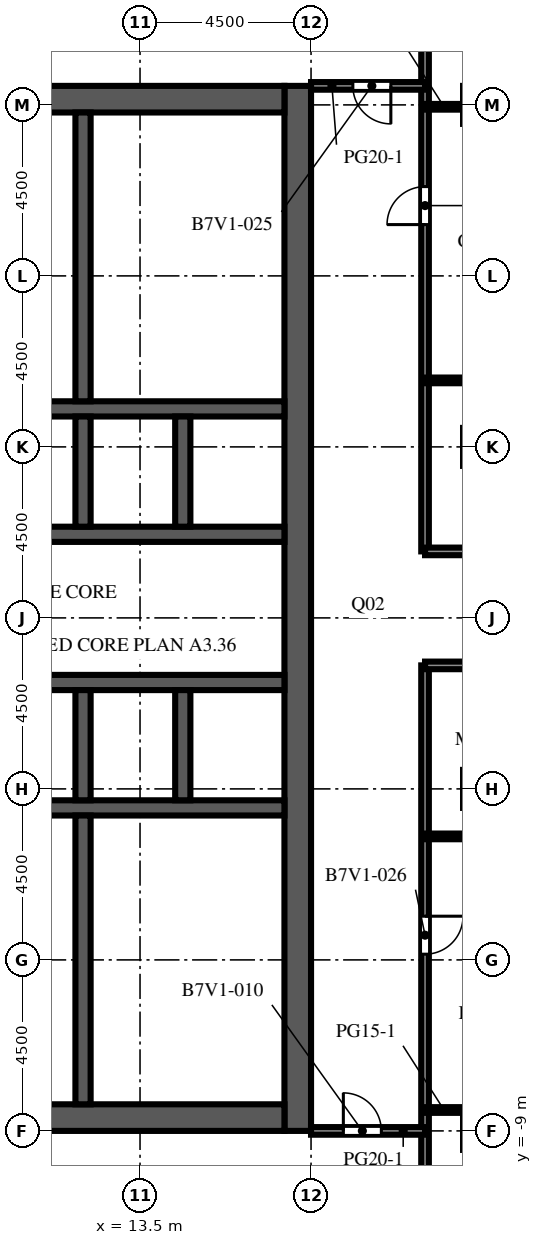
"""IFC4 building model, lengths in metres.
Left out: names, types, materials, properties, quantities, classifications, styles, units other than length and angle.
Written with IfcOpenShell. Run it as: python <this file> out.ifc"""

import sys

from ifc_helpers import new_model, si_unit, direction, frame, frame_2d, origin, place, context, subcontext, project, spatial, rectangle, extrude, element, fill, save


model = new_model("IFC4")
c1 = context("Model", 3, precision=1e-05, world=origin(), true_north=direction((0.0, 1.0)))
c2 = subcontext(c1, "Body", "Model", "MODEL_VIEW")
j1 = project(units=[si_unit("LENGTHUNIT", "METRE"), si_unit("PLANEANGLEUNIT", "RADIAN")], contexts=[c1])
p1 = place(None, origin())
s1 = spatial("IfcSite", under=j1, at=p1, CompositionType="ELEMENT")
p2 = place(p1, origin())
s2 = spatial("IfcBuilding", under=s1, at=p2, CompositionType="ELEMENT")
p3 = place(p2, frame((0.0, 0.0, 243.9)))
s3 = spatial("IfcBuildingStorey", under=s2, at=p3, CompositionType="ELEMENT", Elevation=243.9)
p4 = place(p3, frame((17.65, -9.0, 0.0), z_axis=(0.0, 0.0, 1.0), x_axis=(0.0, 1.0, 0.0)))
e1 = element("IfcWall", 1, at=p4, inside=s3, PredefinedType="SHEAR", context=c2, shape_type="SweptSolid", body=[
    extrude(rectangle(XDim=27.5, YDim=0.7, at=frame_2d((13.75, 0.0))), origin(), (0.0, 0.0, 1.0), 4.1),
])
p5 = place(p4, frame((12.55, 0.0, 0.0)))
e2 = element("IfcOpeningElement", 2, at=p5, cuts=e1, PredefinedType="OPENING", context=c2, shape_type="SweptSolid", body=[
    extrude(rectangle(XDim=2.4, YDim=2.4, at=frame_2d((1.2, 1.2))), frame((0.0, 0.36, 0.0), z_axis=(0.0, -1.0, 0.0), x_axis=(1.0, 0.0, 0.0)), (0.0, 0.0, 1.0), 0.72),
])
p6 = place(p4, frame((6.825, 0.0, 0.0)))
e3 = element("IfcOpeningElement", 3, at=p6, cuts=e1, PredefinedType="OPENING", context=c2, shape_type="SweptSolid", body=[
    extrude(rectangle(XDim=1.2, YDim=2.1, at=frame_2d((0.6, 1.05))), frame((0.0, 0.36, 0.0), z_axis=(0.0, -1.0, 0.0), x_axis=(1.0, 0.0, 0.0)), (0.0, 0.0, 1.0), 0.72),
])
p7 = place(p4, frame((19.475, 0.0, 0.0)))
e4 = element("IfcOpeningElement", 4, at=p7, cuts=e1, PredefinedType="OPENING", context=c2, shape_type="SweptSolid", body=[
    extrude(rectangle(XDim=1.2, YDim=2.1, at=frame_2d((0.6, 1.05))), frame((0.0, 0.36, 0.0), z_axis=(0.0, -1.0, 0.0), x_axis=(1.0, 0.0, 0.0)), (0.0, 0.0, 1.0), 0.72),
])
for number, where, z_axis, x_axis in (
    (5, (6.7, -8.65, 0.0), (0.0, 0.0, 1.0), (1.0, 0.0, 0.0)),
    (6, (6.7, 18.15, 0.0), (0.0, 0.0, 1.0), (1.0, 0.0, 0.0)),
):
    element("IfcWall", number, at=place(p3, frame(where, z_axis=z_axis, x_axis=x_axis)), inside=s3, PredefinedType="SHEAR", context=c2, shape_type="SweptSolid", body=[
        extrude(rectangle(XDim=10.6, YDim=0.7, at=frame_2d((5.3, 0.0))), origin(), (0.0, 0.0, 1.0), 4.1),
    ])
p8 = place(p3, frame((6.7, -0.5, 0.0), z_axis=(0.0, 0.0, 1.0), x_axis=(1.0, 0.0, 0.0)))
e7 = element("IfcWall", 7, at=p8, inside=s3, PredefinedType="SHEAR", context=c2, shape_type="SweptSolid", body=[
    extrude(rectangle(XDim=10.6, YDim=0.4, at=frame_2d((5.3, 0.0))), origin(), (0.0, 0.0, 1.0), 4.1),
])
p9 = place(p3, frame((6.7, 2.8, 0.0), z_axis=(0.0, 0.0, 1.0), x_axis=(1.0, 0.0, 0.0)))
e8 = element("IfcWall", 8, at=p9, inside=s3, PredefinedType="SHEAR", context=c2, shape_type="SweptSolid", body=[
    extrude(rectangle(XDim=10.6, YDim=0.4, at=frame_2d((5.3, 0.0))), origin(), (0.0, 0.0, 1.0), 4.1),
])
p10 = place(p9, frame((0.688, 0.0, 0.0)))
e9 = element("IfcOpeningElement", 9, at=p10, cuts=e8, PredefinedType="OPENING", context=c2, shape_type="SweptSolid", body=[
    extrude(rectangle(XDim=1.1, YDim=2.1, at=frame_2d((0.55, 1.05))), frame((0.0, 0.21, 0.0), z_axis=(0.0, -1.0, 0.0), x_axis=(1.0, 0.0, 0.0)), (0.0, 0.0, 1.0), 0.42),
])
p11 = place(p9, frame((3.438, 0.0, 0.0)))
e10 = element("IfcOpeningElement", 10, at=p11, cuts=e8, PredefinedType="OPENING", context=c2, shape_type="SweptSolid", body=[
    extrude(rectangle(XDim=1.1, YDim=2.1, at=frame_2d((0.55, 1.05))), frame((0.0, 0.21, 0.0), z_axis=(0.0, -1.0, 0.0), x_axis=(1.0, 0.0, 0.0)), (0.0, 0.0, 1.0), 0.42),
])
p12 = place(p9, frame((6.113, 0.0, 0.0)))
e11 = element("IfcOpeningElement", 11, at=p12, cuts=e8, PredefinedType="OPENING", context=c2, shape_type="SweptSolid", body=[
    extrude(rectangle(XDim=1.0, YDim=2.1, at=frame_2d((0.5, 1.05))), frame((0.0, 0.21, 0.0), z_axis=(0.0, -1.0, 0.0), x_axis=(1.0, 0.0, 0.0)), (0.0, 0.0, 1.0), 0.42),
])
p13 = place(p9, frame((8.863, 0.0, 0.0)))
e12 = element("IfcOpeningElement", 12, at=p13, cuts=e8, PredefinedType="OPENING", context=c2, shape_type="SweptSolid", body=[
    extrude(rectangle(XDim=1.0, YDim=2.1, at=frame_2d((0.5, 1.05))), frame((0.0, 0.21, 0.0), z_axis=(0.0, -1.0, 0.0), x_axis=(1.0, 0.0, 0.0)), (0.0, 0.0, 1.0), 0.42),
])
p14 = place(p3, frame((6.7, 6.7, 0.0), z_axis=(0.0, 0.0, 1.0), x_axis=(1.0, 0.0, 0.0)))
e13 = element("IfcWall", 13, at=p14, inside=s3, PredefinedType="SHEAR", context=c2, shape_type="SweptSolid", body=[
    extrude(rectangle(XDim=10.6, YDim=0.4, at=frame_2d((5.3, 0.0))), origin(), (0.0, 0.0, 1.0), 4.1),
])
p15 = place(p14, frame((3.438, 0.0, 0.0)))
e14 = element("IfcOpeningElement", 14, at=p15, cuts=e13, PredefinedType="OPENING", context=c2, shape_type="SweptSolid", body=[
    extrude(rectangle(XDim=1.1, YDim=2.1, at=frame_2d((0.55, 1.05))), frame((0.0, 0.21, 0.0), z_axis=(0.0, -1.0, 0.0), x_axis=(1.0, 0.0, 0.0)), (0.0, 0.0, 1.0), 0.42),
])
p16 = place(p14, frame((6.062, 0.0, 0.0)))
e15 = element("IfcOpeningElement", 15, at=p16, cuts=e13, PredefinedType="OPENING", context=c2, shape_type="SweptSolid", body=[
    extrude(rectangle(XDim=1.1, YDim=2.1, at=frame_2d((0.55, 1.05))), frame((0.0, 0.21, 0.0), z_axis=(0.0, -1.0, 0.0), x_axis=(1.0, 0.0, 0.0)), (0.0, 0.0, 1.0), 0.42),
])
p17 = place(p14, frame((8.812, 0.0, 0.0)))
e16 = element("IfcOpeningElement", 16, at=p17, cuts=e13, PredefinedType="OPENING", context=c2, shape_type="SweptSolid", body=[
    extrude(rectangle(XDim=1.1, YDim=2.1, at=frame_2d((0.55, 1.05))), frame((0.0, 0.21, 0.0), z_axis=(0.0, -1.0, 0.0), x_axis=(1.0, 0.0, 0.0)), (0.0, 0.0, 1.0), 0.42),
])
p18 = place(p14, frame((0.738, 0.0, 0.0)))
e17 = element("IfcOpeningElement", 17, at=p18, cuts=e13, PredefinedType="OPENING", context=c2, shape_type="SweptSolid", body=[
    extrude(rectangle(XDim=1.0, YDim=2.1, at=frame_2d((0.5, 1.05))), frame((0.0, 0.21, 0.0), z_axis=(0.0, -1.0, 0.0), x_axis=(1.0, 0.0, 0.0)), (0.0, 0.0, 1.0), 0.42),
])
p19 = place(p3, frame((6.7, 10.0, 0.0), z_axis=(0.0, 0.0, 1.0), x_axis=(1.0, 0.0, 0.0)))
e18 = element("IfcWall", 18, at=p19, inside=s3, PredefinedType="SHEAR", context=c2, shape_type="SweptSolid", body=[
    extrude(rectangle(XDim=10.6, YDim=0.4, at=frame_2d((5.3, 0.0))), origin(), (0.0, 0.0, 1.0), 4.1),
])
for number, where, z_axis, x_axis in (
    (19, (12.0, -0.3, 0.0), (0.0, 0.0, 1.0), (0.0, 1.0, 0.0)),
    (20, (12.0, 6.9, 0.0), (0.0, 0.0, 1.0), (0.0, 1.0, 0.0)),
    (21, (14.625, -0.3, 0.0), (0.0, 0.0, 1.0), (0.0, 1.0, 0.0)),
    (22, (14.625, 6.9, 0.0), (0.0, 0.0, 1.0), (0.0, 1.0, 0.0)),
):
    element("IfcWall", number, at=place(p3, frame(where, z_axis=z_axis, x_axis=x_axis)), inside=s3, PredefinedType="SHEAR", context=c2, shape_type="SweptSolid", body=[
        extrude(rectangle(XDim=2.9, YDim=0.4, at=frame_2d((1.45, 0.0))), origin(), (0.0, 0.0, 1.0), 4.1),
    ])
for number, where, z_axis, x_axis in (
    (23, (12.0, -8.3, 0.0), (0.0, 0.0, 1.0), (0.0, 1.0, 0.0)),
    (24, (12.0, 10.2, 0.0), (0.0, 0.0, 1.0), (0.0, 1.0, 0.0)),
):
    element("IfcWall", number, at=place(p3, frame(where, z_axis=z_axis, x_axis=x_axis)), inside=s3, PredefinedType="SHEAR", context=c2, shape_type="SweptSolid", body=[
        extrude(rectangle(XDim=7.6, YDim=0.4, at=frame_2d((3.8, 0.0))), origin(), (0.0, 0.0, 1.0), 4.1),
    ])
for number, where, z_axis, x_axis in (
    (25, (8.2, -5.716, 0.0), (0.0, 0.0, 1.0), (1.0, 0.0, 0.0)),
    (26, (8.2, -3.588, 0.0), (0.0, 0.0, 1.0), (1.0, 0.0, 0.0)),
):
    element("IfcWall", number, at=place(p3, frame(where, z_axis=z_axis, x_axis=x_axis)), inside=s3, PredefinedType="PARTITIONING", context=c2, shape_type="SweptSolid", body=[
        extrude(rectangle(XDim=3.6, YDim=0.1, at=frame_2d((1.8, 0.0))), origin(), (0.0, 0.0, 1.0), 3.65),
    ])
for number, where, z_axis, x_axis in (
    (27, (8.1, 12.48, 0.0), (0.0, 0.0, 1.0), (1.0, 0.0, 0.0)),
    (28, (8.1, 14.912, 0.0), (0.0, 0.0, 1.0), (1.0, 0.0, 0.0)),
):
    element("IfcWall", number, at=place(p3, frame(where, z_axis=z_axis, x_axis=x_axis)), inside=s3, PredefinedType="PARTITIONING", context=c2, shape_type="SweptSolid", body=[
        extrude(rectangle(XDim=3.7, YDim=0.1, at=frame_2d((1.85, 0.0))), origin(), (0.0, 0.0, 1.0), 3.65),
    ])
p20 = place(p3, frame((21.0, 3.25, 0.0), z_axis=(0.0, 0.0, 1.0), x_axis=(0.0, -1.0, 0.0)))
e29 = element("IfcWall", 29, at=p20, inside=s3, PredefinedType="PARTITIONING", context=c2, shape_type="SweptSolid", body=[
    extrude(rectangle(XDim=25.6, YDim=0.2, at=frame_2d((12.8, 0.0))), origin(), (0.0, 0.0, 1.0), 3.65),
])
p21 = place(p20, frame((6.6, 0.0, 0.0)))
e30 = element("IfcOpeningElement", 30, at=p21, cuts=e29, PredefinedType="OPENING", context=c2, shape_type="SweptSolid", body=[
    extrude(rectangle(XDim=1.0, YDim=2.1, at=frame_2d((0.5, 1.05))), frame((0.0, 0.11, 0.0), z_axis=(0.0, -1.0, 0.0), x_axis=(1.0, 0.0, 0.0)), (0.0, 0.0, 1.0), 0.22),
])
p22 = place(p3, frame((21.0, 31.35, 0.0), z_axis=(0.0, 0.0, 1.0), x_axis=(0.0, -1.0, 0.0)))
e31 = element("IfcWall", 31, at=p22, inside=s3, PredefinedType="PARTITIONING", context=c2, shape_type="SweptSolid", body=[
    extrude(rectangle(XDim=25.1, YDim=0.2, at=frame_2d((12.55, 0.0))), origin(), (0.0, 0.0, 1.0), 3.65),
])
p23 = place(p22, frame((15.5, 0.0, 0.0)))
e32 = element("IfcOpeningElement", 32, at=p23, cuts=e31, PredefinedType="OPENING", context=c2, shape_type="SweptSolid", body=[
    extrude(rectangle(XDim=1.0, YDim=2.1, at=frame_2d((0.5, 1.05))), frame((0.0, 0.11, 0.0), z_axis=(0.0, -1.0, 0.0), x_axis=(1.0, 0.0, 0.0)), (0.0, 0.0, 1.0), 0.22),
])
p24 = place(p3, frame((21.0, -9.0, 0.0), z_axis=(0.0, 0.0, 1.0), x_axis=(-1.0, 0.0, 0.0)))
e33 = element("IfcWall", 33, at=p24, inside=s3, PredefinedType="PARTITIONING", context=c2, shape_type="SweptSolid", body=[
    extrude(rectangle(XDim=3.0, YDim=0.2, at=frame_2d((1.5, 0.0))), origin(), (0.0, 0.0, 1.0), 3.65),
])
p25 = place(p24, frame((1.15, 0.0, 0.0)))
e34 = element("IfcOpeningElement", 34, at=p25, cuts=e33, PredefinedType="OPENING", context=c2, shape_type="SweptSolid", body=[
    extrude(rectangle(XDim=1.0, YDim=2.1, at=frame_2d((0.5, 1.05))), frame((0.0, 0.11, 0.0), z_axis=(0.0, -1.0, 0.0), x_axis=(1.0, 0.0, 0.0)), (0.0, 0.0, 1.0), 0.22),
])
p26 = place(p3, frame((21.0, -8.45, 0.0), z_axis=(0.0, 0.0, 1.0), x_axis=(1.0, 0.0, 0.0)))
e35 = element("IfcWall", 35, at=p26, inside=s3, PredefinedType="PARTITIONING", context=c2, shape_type="SweptSolid", body=[
    extrude(rectangle(XDim=1.0, YDim=0.15, at=frame_2d((0.5, 0.0))), origin(), (0.0, 0.0, 1.0), 3.65),
])
p27 = place(p3, frame((21.0, -1.25, 0.0), z_axis=(0.0, 0.0, 1.0), x_axis=(1.0, 0.0, 0.0)))
e36 = element("IfcWall", 36, at=p27, inside=s3, PredefinedType="PARTITIONING", context=c2, shape_type="SweptSolid", body=[
    extrude(rectangle(XDim=5.85, YDim=0.15, at=frame_2d((2.925, 0.0))), origin(), (0.0, 0.0, 1.0), 3.65),
])
p28 = place(p27, frame((3.1, 0.0, 0.0)))
e37 = element("IfcOpeningElement", 37, at=p28, cuts=e36, PredefinedType="OPENING", context=c2, shape_type="SweptSolid", body=[
    extrude(rectangle(XDim=1.0, YDim=2.1, at=frame_2d((0.5, 1.05))), frame((0.0, 0.085, 0.0), z_axis=(0.0, -1.0, 0.0), x_axis=(1.0, 0.0, 0.0)), (0.0, 0.0, 1.0), 0.17),
])
for number, where, z_axis, x_axis in (
    (38, (21.0, 3.25, 0.0), (0.0, 0.0, 1.0), (1.0, 0.0, 0.0)),
    (39, (21.0, 6.25, 0.0), (0.0, 0.0, 1.0), (1.0, 0.0, 0.0)),
):
    element("IfcWall", number, at=place(p3, frame(where, z_axis=z_axis, x_axis=x_axis)), inside=s3, PredefinedType="PARTITIONING", context=c2, shape_type="SweptSolid", body=[
        extrude(rectangle(XDim=5.85, YDim=0.2, at=frame_2d((2.925, 0.0))), origin(), (0.0, 0.0, 1.0), 3.65),
    ])
p29 = place(p3, frame((26.85, 10.75, 0.0), z_axis=(0.0, 0.0, 1.0), x_axis=(-1.0, 0.0, 0.0)))
e40 = element("IfcWall", 40, at=p29, inside=s3, PredefinedType="PARTITIONING", context=c2, shape_type="SweptSolid", body=[
    extrude(rectangle(XDim=5.85, YDim=0.15, at=frame_2d((2.925, 0.0))), origin(), (0.0, 0.0, 1.0), 3.65),
])
p30 = place(p29, frame((2.0, 0.0, 0.0)))
e41 = element("IfcOpeningElement", 41, at=p30, cuts=e40, PredefinedType="OPENING", context=c2, shape_type="SweptSolid", body=[
    extrude(rectangle(XDim=1.0, YDim=2.1, at=frame_2d((0.5, 1.05))), frame((0.0, 0.085, 0.0), z_axis=(0.0, -1.0, 0.0), x_axis=(1.0, 0.0, 0.0)), (0.0, 0.0, 1.0), 0.17),
])
p31 = place(p3, frame((21.0, 17.95, 0.0), z_axis=(0.0, 0.0, 1.0), x_axis=(1.0, 0.0, 0.0)))
e42 = element("IfcWall", 42, at=p31, inside=s3, PredefinedType="PARTITIONING", context=c2, shape_type="SweptSolid", body=[
    extrude(rectangle(XDim=1.0, YDim=0.15, at=frame_2d((0.5, 0.0))), origin(), (0.0, 0.0, 1.0), 3.65),
])
p32 = place(p3, frame((18.0, 18.5, 0.0), z_axis=(0.0, 0.0, 1.0), x_axis=(1.0, 0.0, 0.0)))
e43 = element("IfcWall", 43, at=p32, inside=s3, PredefinedType="PARTITIONING", context=c2, shape_type="SweptSolid", body=[
    extrude(rectangle(XDim=3.0, YDim=0.2, at=frame_2d((1.5, 0.0))), origin(), (0.0, 0.0, 1.0), 3.65),
])
p33 = place(p32, frame((1.1, 0.0, 0.0)))
e44 = element("IfcOpeningElement", 44, at=p33, cuts=e43, PredefinedType="OPENING", context=c2, shape_type="SweptSolid", body=[
    extrude(rectangle(XDim=1.0, YDim=2.1, at=frame_2d((0.5, 1.05))), frame((0.0, 0.11, 0.0), z_axis=(0.0, -1.0, 0.0), x_axis=(1.0, 0.0, 0.0)), (0.0, 0.0, 1.0), 0.22),
])
p34 = place(p11, origin())
e45 = element("IfcDoor", 45, at=p34, inside=s3, OperationType="DOUBLE_DOOR_SLIDING", PredefinedType="DOOR", context=c2, shape_type="SweptSolid", body=[
    extrude(rectangle(XDim=1.1, YDim=2.1, at=frame_2d((0.55, 1.05))), frame((0.0, 0.025, 0.0), z_axis=(0.0, -1.0, 0.0), x_axis=(1.0, 0.0, 0.0)), (0.0, 0.0, 1.0), 0.05),
])
fill(e10, e45)
p35 = place(p15, origin())
e46 = element("IfcDoor", 46, at=p35, inside=s3, OperationType="DOUBLE_DOOR_SLIDING", PredefinedType="DOOR", context=c2, shape_type="SweptSolid", body=[
    extrude(rectangle(XDim=1.1, YDim=2.1, at=frame_2d((0.55, 1.05))), frame((0.0, 0.025, 0.0), z_axis=(0.0, -1.0, 0.0), x_axis=(1.0, 0.0, 0.0)), (0.0, 0.0, 1.0), 0.05),
])
fill(e14, e46)
p36 = place(p16, origin())
e47 = element("IfcDoor", 47, at=p36, inside=s3, OperationType="DOUBLE_DOOR_SLIDING", PredefinedType="DOOR", context=c2, shape_type="SweptSolid", body=[
    extrude(rectangle(XDim=1.1, YDim=2.1, at=frame_2d((0.55, 1.05))), frame((0.0, 0.025, 0.0), z_axis=(0.0, -1.0, 0.0), x_axis=(1.0, 0.0, 0.0)), (0.0, 0.0, 1.0), 0.05),
])
fill(e15, e47)
p37 = place(p17, origin())
e48 = element("IfcDoor", 48, at=p37, inside=s3, OperationType="DOUBLE_DOOR_SLIDING", PredefinedType="DOOR", context=c2, shape_type="SweptSolid", body=[
    extrude(rectangle(XDim=1.1, YDim=2.1, at=frame_2d((0.55, 1.05))), frame((0.0, 0.025, 0.0), z_axis=(0.0, -1.0, 0.0), x_axis=(1.0, 0.0, 0.0)), (0.0, 0.0, 1.0), 0.05),
])
fill(e16, e48)
p38 = place(p5, origin())
e49 = element("IfcDoor", 49, at=p38, inside=s3, OperationType="DOUBLE_DOOR_DOUBLE_SWING", PredefinedType="DOOR", context=c2, shape_type="SweptSolid", body=[
    extrude(rectangle(XDim=2.4, YDim=2.4, at=frame_2d((1.2, 1.2))), frame((0.0, 0.025, 0.0), z_axis=(0.0, -1.0, 0.0), x_axis=(1.0, 0.0, 0.0)), (0.0, 0.0, 1.0), 0.05),
])
fill(e2, e49)
p39 = place(p6, frame((1.2, 0.0, 0.0), z_axis=(0.0, 0.0, 1.0), x_axis=(-1.0, 0.0, 0.0)))
e50 = element("IfcDoor", 50, at=p39, inside=s3, OperationType="SINGLE_SWING_LEFT", PredefinedType="DOOR", context=c2, shape_type="SweptSolid", body=[
    extrude(rectangle(XDim=1.2, YDim=2.1, at=frame_2d((0.6, 1.05))), frame((0.0, 0.025, 0.0), z_axis=(0.0, -1.0, 0.0), x_axis=(1.0, 0.0, 0.0)), (0.0, 0.0, 1.0), 0.05),
])
fill(e3, e50)
p40 = place(p7, frame((1.2, 0.0, 0.0), z_axis=(0.0, 0.0, 1.0), x_axis=(-1.0, 0.0, 0.0)))
e51 = element("IfcDoor", 51, at=p40, inside=s3, OperationType="SINGLE_SWING_LEFT", PredefinedType="DOOR", context=c2, shape_type="SweptSolid", body=[
    extrude(rectangle(XDim=1.2, YDim=2.1, at=frame_2d((0.6, 1.05))), frame((0.0, 0.025, 0.0), z_axis=(0.0, -1.0, 0.0), x_axis=(1.0, 0.0, 0.0)), (0.0, 0.0, 1.0), 0.05),
])
fill(e4, e51)
p41 = place(p12, origin())
e52 = element("IfcDoor", 52, at=p41, inside=s3, OperationType="SINGLE_SWING_LEFT", PredefinedType="DOOR", context=c2, shape_type="SweptSolid", body=[
    extrude(rectangle(XDim=1.0, YDim=2.1, at=frame_2d((0.5, 1.05))), frame((0.0, 0.025, 0.0), z_axis=(0.0, -1.0, 0.0), x_axis=(1.0, 0.0, 0.0)), (0.0, 0.0, 1.0), 0.05),
])
fill(e11, e52)
p42 = place(p13, origin())
e53 = element("IfcDoor", 53, at=p42, inside=s3, OperationType="SINGLE_SWING_RIGHT", PredefinedType="DOOR", context=c2, shape_type="SweptSolid", body=[
    extrude(rectangle(XDim=1.0, YDim=2.1, at=frame_2d((0.5, 1.05))), frame((0.0, 0.025, 0.0), z_axis=(0.0, -1.0, 0.0), x_axis=(1.0, 0.0, 0.0)), (0.0, 0.0, 1.0), 0.05),
])
fill(e12, e53)
p43 = place(p25, origin())
e54 = element("IfcDoor", 54, at=p43, inside=s3, OperationType="SINGLE_SWING_RIGHT", PredefinedType="DOOR", context=c2, shape_type="SweptSolid", body=[
    extrude(rectangle(XDim=1.0, YDim=2.1, at=frame_2d((0.5, 1.05))), frame((0.0, 0.025, 0.0), z_axis=(0.0, -1.0, 0.0), x_axis=(1.0, 0.0, 0.0)), (0.0, 0.0, 1.0), 0.05),
])
fill(e34, e54)
p44 = place(p33, origin())
e55 = element("IfcDoor", 55, at=p44, inside=s3, OperationType="SINGLE_SWING_RIGHT", PredefinedType="DOOR", context=c2, shape_type="SweptSolid", body=[
    extrude(rectangle(XDim=1.0, YDim=2.1, at=frame_2d((0.5, 1.05))), frame((0.0, 0.025, 0.0), z_axis=(0.0, -1.0, 0.0), x_axis=(1.0, 0.0, 0.0)), (0.0, 0.0, 1.0), 0.05),
])
fill(e44, e55)
p45 = place(p21, origin())
e56 = element("IfcDoor", 56, at=p45, inside=s3, OperationType="SINGLE_SWING_LEFT", PredefinedType="DOOR", context=c2, shape_type="SweptSolid", body=[
    extrude(rectangle(XDim=1.0, YDim=2.1, at=frame_2d((0.5, 1.05))), frame((0.0, 0.025, 0.0), z_axis=(0.0, -1.0, 0.0), x_axis=(1.0, 0.0, 0.0)), (0.0, 0.0, 1.0), 0.05),
])
fill(e30, e56)
p46 = place(p23, origin())
e57 = element("IfcDoor", 57, at=p46, inside=s3, OperationType="SINGLE_SWING_RIGHT", PredefinedType="DOOR", context=c2, shape_type="SweptSolid", body=[
    extrude(rectangle(XDim=1.0, YDim=2.1, at=frame_2d((0.5, 1.05))), frame((0.0, 0.025, 0.0), z_axis=(0.0, -1.0, 0.0), x_axis=(1.0, 0.0, 0.0)), (0.0, 0.0, 1.0), 0.05),
])
fill(e32, e57)
save(model, sys.argv[1])
